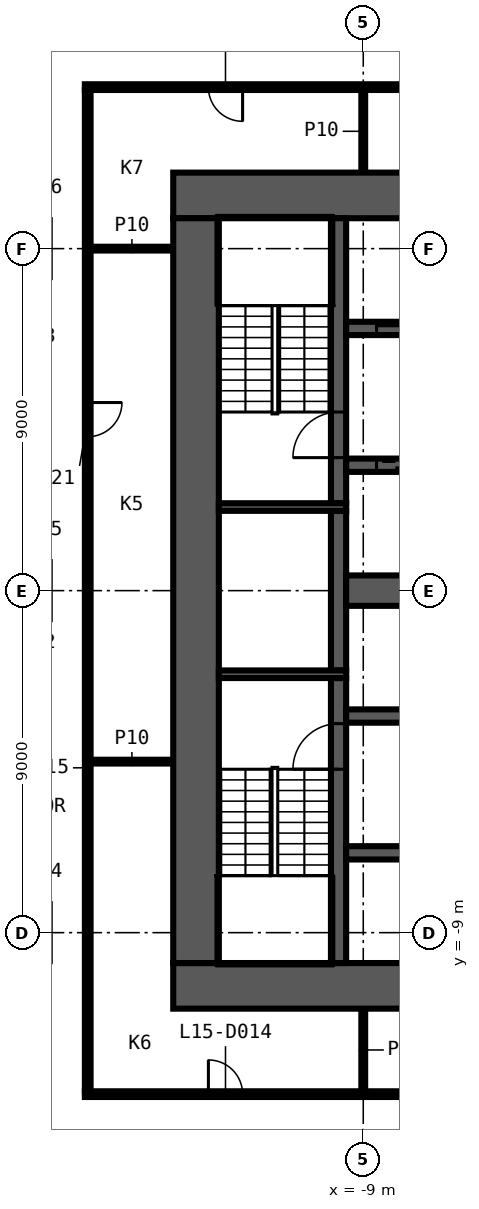
"""IFC4 building model, lengths in metres.
Left out: names, types, materials, properties, quantities, classifications, styles, units other than length and angle.
Written with IfcOpenShell. Run it as: python <this file> out.ifc"""

import sys

from ifc_helpers import new_model, si_unit, direction, frame, frame_2d, origin, place, context, subcontext, project, spatial, rectangle, extrude, element, fill, save


model = new_model("IFC4")
c1 = context("Model", 3, precision=1e-05, world=origin(), true_north=direction((0.0, 1.0)))
c2 = subcontext(c1, "Body", "Model", "MODEL_VIEW")
j1 = project(units=[si_unit("LENGTHUNIT", "METRE"), si_unit("PLANEANGLEUNIT", "RADIAN")], contexts=[c1])
p1 = place(None, origin())
s1 = spatial("IfcSite", under=j1, at=p1, CompositionType="ELEMENT")
p2 = place(p1, origin())
s2 = spatial("IfcBuilding", under=s1, at=p2, CompositionType="ELEMENT")
p3 = place(p2, frame((0.0, 0.0, 77.3)))
s3 = spatial("IfcBuildingStorey", under=s2, at=p3, CompositionType="ELEMENT", Elevation=77.3)
p4 = place(p3, frame((-16.325, -13.25, 0.0), z_axis=(0.0, 0.0, 1.0), x_axis=(1.0, 0.0, 0.0)))
e1 = element("IfcWall", 1, at=p4, inside=s3, PredefinedType="PARTITIONING", context=c2, shape_type="SweptSolid", body=[
    extrude(rectangle(XDim=23.15, YDim=0.15, at=frame_2d((11.575, 0.0))), origin(), (0.0, 0.0, 1.0), 3.3),
])
p5 = place(p4, frame((3.25, 0.0, 0.0)))
e2 = element("IfcOpeningElement", 2, at=p5, cuts=e1, PredefinedType="OPENING", context=c2, shape_type="SweptSolid", body=[
    extrude(rectangle(XDim=0.9, YDim=2.1, at=frame_2d((0.45, 1.05))), frame((0.0, 0.085, 0.0), z_axis=(0.0, -1.0, 0.0), x_axis=(1.0, 0.0, 0.0)), (0.0, 0.0, 1.0), 0.17),
])
p6 = place(p4, frame((19.25, 0.0, 0.0)))
e3 = element("IfcOpeningElement", 3, at=p6, cuts=e1, PredefinedType="OPENING", context=c2, shape_type="SweptSolid", body=[
    extrude(rectangle(XDim=0.9, YDim=2.1, at=frame_2d((0.45, 1.05))), frame((0.0, 0.085, 0.0), z_axis=(0.0, -1.0, 0.0), x_axis=(1.0, 0.0, 0.0)), (0.0, 0.0, 1.0), 0.17),
])
for number, where, z_axis, x_axis in (
    (4, (-16.175, -4.5, 0.0), (0.0, 0.0, 1.0), (1.0, 0.0, 0.0)),
    (5, (-16.175, 9.0, 0.0), (0.0, 0.0, 1.0), (1.0, 0.0, 0.0)),
):
    element("IfcWall", number, at=place(p3, frame(where, z_axis=z_axis, x_axis=x_axis)), inside=s3, PredefinedType="PARTITIONING", context=c2, shape_type="SweptSolid", body=[
        extrude(rectangle(XDim=2.175, YDim=0.1, at=frame_2d((1.087, 0.0))), origin(), (0.0, 0.0, 1.0), 3.3),
    ])
p7 = place(p3, frame((1.425, 13.25, 0.0), z_axis=(0.0, 0.0, 1.0), x_axis=(-1.0, 0.0, 0.0)))
e6 = element("IfcWall", 6, at=p7, inside=s3, PredefinedType="PARTITIONING", context=c2, shape_type="SweptSolid", body=[
    extrude(rectangle(XDim=17.75, YDim=0.15, at=frame_2d((8.875, 0.0))), origin(), (0.0, 0.0, 1.0), 3.3),
])
p8 = place(p7, frame((7.725, 0.0, 0.0)))
e7 = element("IfcOpeningElement", 7, at=p8, cuts=e6, PredefinedType="OPENING", context=c2, shape_type="SweptSolid", body=[
    extrude(rectangle(XDim=0.9, YDim=2.1, at=frame_2d((0.45, 1.05))), frame((0.0, 0.085, 0.0), z_axis=(0.0, -1.0, 0.0), x_axis=(1.0, 0.0, 0.0)), (0.0, 0.0, 1.0), 0.17),
])
p9 = place(p7, frame((13.6, 0.0, 0.0)))
e8 = element("IfcOpeningElement", 8, at=p9, cuts=e6, PredefinedType="OPENING", context=c2, shape_type="SweptSolid", body=[
    extrude(rectangle(XDim=0.9, YDim=2.1, at=frame_2d((0.45, 1.05))), frame((0.0, 0.085, 0.0), z_axis=(0.0, -1.0, 0.0), x_axis=(1.0, 0.0, 0.0)), (0.0, 0.0, 1.0), 0.17),
])
for number, where, z_axis, x_axis in (
    (9, (-9.0, -13.175, 0.0), (0.0, 0.0, 1.0), (0.0, 1.0, 0.0)),
    (10, (-9.0, 11.0, 0.0), (0.0, 0.0, 1.0), (0.0, 1.0, 0.0)),
):
    element("IfcWall", number, at=place(p3, frame(where, z_axis=z_axis, x_axis=x_axis)), inside=s3, PredefinedType="PARTITIONING", context=c2, shape_type="SweptSolid", body=[
        extrude(rectangle(XDim=2.175, YDim=0.1, at=frame_2d((1.087, 0.0))), origin(), (0.0, 0.0, 1.0), 3.3),
    ])
p10 = place(p3, frame((-16.25, 13.175, 0.0), z_axis=(0.0, 0.0, 1.0), x_axis=(0.0, -1.0, 0.0)))
e11 = element("IfcWall", 11, at=p10, inside=s3, PredefinedType="PARTITIONING", context=c2, shape_type="SweptSolid", body=[
    extrude(rectangle(XDim=26.35, YDim=0.15, at=frame_2d((13.175, 0.0))), origin(), (0.0, 0.0, 1.0), 3.3),
])
p11 = place(p10, frame((8.225, 0.0, 0.0)))
e12 = element("IfcOpeningElement", 12, at=p11, cuts=e11, PredefinedType="OPENING", context=c2, shape_type="SweptSolid", body=[
    extrude(rectangle(XDim=0.9, YDim=2.1, at=frame_2d((0.45, 1.05))), frame((0.0, 0.085, 0.0), z_axis=(0.0, -1.0, 0.0), x_axis=(1.0, 0.0, 0.0)), (0.0, 0.0, 1.0), 0.17),
])
p12 = place(p3, frame((-14.0, 10.4, 0.0), z_axis=(0.0, 0.0, 1.0), x_axis=(1.0, 0.0, 0.0)))
e13 = element("IfcWall", 13, at=p12, inside=s3, PredefinedType="SHEAR", context=c2, shape_type="SweptSolid", body=[
    extrude(rectangle(XDim=28.0, YDim=1.2, at=frame_2d((14.0, 0.0))), origin(), (0.0, 0.0, 1.0), 3.3),
])
p13 = place(p12, frame((15.9, 0.0, 0.0)))
e14 = element("IfcOpeningElement", 14, at=p13, cuts=e13, PredefinedType="OPENING", context=c2, shape_type="SweptSolid", body=[
    extrude(rectangle(XDim=1.6, YDim=2.1, at=frame_2d((0.8, 1.05))), frame((0.0, 0.61, 0.0), z_axis=(0.0, -1.0, 0.0), x_axis=(1.0, 0.0, 0.0)), (0.0, 0.0, 1.0), 1.22),
])
p14 = place(p3, frame((14.0, -10.4, 0.0), z_axis=(0.0, 0.0, 1.0), x_axis=(-1.0, 0.0, 0.0)))
e15 = element("IfcWall", 15, at=p14, inside=s3, PredefinedType="SHEAR", context=c2, shape_type="SweptSolid", body=[
    extrude(rectangle(XDim=28.0, YDim=1.2, at=frame_2d((14.0, 0.0))), origin(), (0.0, 0.0, 1.0), 3.3),
])
p15 = place(p14, frame((5.1, 0.0, 0.0)))
e16 = element("IfcOpeningElement", 16, at=p15, cuts=e15, PredefinedType="OPENING", context=c2, shape_type="SweptSolid", body=[
    extrude(rectangle(XDim=1.6, YDim=2.1, at=frame_2d((0.8, 1.05))), frame((0.0, 0.61, 0.0), z_axis=(0.0, -1.0, 0.0), x_axis=(1.0, 0.0, 0.0)), (0.0, 0.0, 1.0), 1.22),
])
p16 = place(p3, frame((-13.4, -9.8, 0.0), z_axis=(0.0, 0.0, 1.0), x_axis=(0.0, 1.0, 0.0)))
e17 = element("IfcWall", 17, at=p16, inside=s3, PredefinedType="SHEAR", context=c2, shape_type="SweptSolid", body=[
    extrude(rectangle(XDim=19.6, YDim=1.2, at=frame_2d((9.8, 0.0))), origin(), (0.0, 0.0, 1.0), 3.3),
])
p17 = place(p3, frame((-9.65, -9.8, 0.0), z_axis=(0.0, 0.0, 1.0), x_axis=(0.0, 1.0, 0.0)))
e18 = element("IfcWall", 18, at=p17, inside=s3, PredefinedType="SHEAR", context=c2, shape_type="SweptSolid", body=[
    extrude(rectangle(XDim=7.5, YDim=0.4, at=frame_2d((3.75, 0.0))), origin(), (0.0, 0.0, 1.0), 3.3),
])
p18 = place(p17, frame((5.1, 0.0, 0.0)))
e19 = element("IfcOpeningElement", 19, at=p18, cuts=e18, PredefinedType="OPENING", context=c2, shape_type="SweptSolid", body=[
    extrude(rectangle(XDim=1.2, YDim=2.1, at=frame_2d((0.6, 1.05))), frame((0.0, 0.21, 0.0), z_axis=(0.0, -1.0, 0.0), x_axis=(1.0, 0.0, 0.0)), (0.0, 0.0, 1.0), 0.42),
])
p19 = place(p3, frame((-9.65, -2.1, 0.0), z_axis=(0.0, 0.0, 1.0), x_axis=(0.0, 1.0, 0.0)))
e20 = element("IfcWall", 20, at=p19, inside=s3, PredefinedType="SHEAR", context=c2, shape_type="SweptSolid", body=[
    extrude(rectangle(XDim=4.2, YDim=0.4, at=frame_2d((2.1, 0.0))), origin(), (0.0, 0.0, 1.0), 3.3),
])
p20 = place(p3, frame((-9.65, 2.3, 0.0), z_axis=(0.0, 0.0, 1.0), x_axis=(0.0, 1.0, 0.0)))
e21 = element("IfcWall", 21, at=p20, inside=s3, PredefinedType="SHEAR", context=c2, shape_type="SweptSolid", body=[
    extrude(rectangle(XDim=7.5, YDim=0.4, at=frame_2d((3.75, 0.0))), origin(), (0.0, 0.0, 1.0), 3.3),
])
p21 = place(p20, frame((1.2, 0.0, 0.0)))
e22 = element("IfcOpeningElement", 22, at=p21, cuts=e21, PredefinedType="OPENING", context=c2, shape_type="SweptSolid", body=[
    extrude(rectangle(XDim=1.2, YDim=2.1, at=frame_2d((0.6, 1.05))), frame((0.0, 0.21, 0.0), z_axis=(0.0, -1.0, 0.0), x_axis=(1.0, 0.0, 0.0)), (0.0, 0.0, 1.0), 0.42),
])
for number, where, z_axis, x_axis in (
    (23, (-9.45, 2.2, 0.0), (0.0, 0.0, 1.0), (-1.0, 0.0, 0.0)),
    (24, (-9.45, -2.2, 0.0), (0.0, 0.0, 1.0), (-1.0, 0.0, 0.0)),
):
    element("IfcWall", number, at=place(p3, frame(where, z_axis=z_axis, x_axis=x_axis)), inside=s3, PredefinedType="SHEAR", context=c2, shape_type="SweptSolid", body=[
        extrude(rectangle(XDim=3.35, YDim=0.2, at=frame_2d((1.675, 0.0))), origin(), (0.0, 0.0, 1.0), 3.3),
    ])
p22 = place(p3, frame((-9.45, 6.9, 0.0), z_axis=(0.0, 0.0, 1.0), x_axis=(1.0, 0.0, 0.0)))
e25 = element("IfcWall", 25, at=p22, inside=s3, PredefinedType="SHEAR", context=c2, shape_type="SweptSolid", body=[
    extrude(rectangle(XDim=18.9, YDim=0.35, at=frame_2d((9.45, 0.0))), origin(), (0.0, 0.0, 1.0), 3.3),
])
p23 = place(p22, frame((0.8, 0.0, 0.0)))
e26 = element("IfcOpeningElement", 26, at=p23, cuts=e25, PredefinedType="OPENING", context=c2, shape_type="SweptSolid", body=[
    extrude(rectangle(XDim=1.1, YDim=2.1, at=frame_2d((0.55, 1.05))), frame((0.0, 0.185, 0.0), z_axis=(0.0, -1.0, 0.0), x_axis=(1.0, 0.0, 0.0)), (0.0, 0.0, 1.0), 0.37),
])
p24 = place(p22, frame((3.5, 0.0, 0.0)))
e27 = element("IfcOpeningElement", 27, at=p24, cuts=e25, PredefinedType="OPENING", context=c2, shape_type="SweptSolid", body=[
    extrude(rectangle(XDim=1.1, YDim=2.1, at=frame_2d((0.55, 1.05))), frame((0.0, 0.185, 0.0), z_axis=(0.0, -1.0, 0.0), x_axis=(1.0, 0.0, 0.0)), (0.0, 0.0, 1.0), 0.37),
])
p25 = place(p22, frame((6.2, 0.0, 0.0)))
e28 = element("IfcOpeningElement", 28, at=p25, cuts=e25, PredefinedType="OPENING", context=c2, shape_type="SweptSolid", body=[
    extrude(rectangle(XDim=1.1, YDim=2.1, at=frame_2d((0.55, 1.05))), frame((0.0, 0.185, 0.0), z_axis=(0.0, -1.0, 0.0), x_axis=(1.0, 0.0, 0.0)), (0.0, 0.0, 1.0), 0.37),
])
p26 = place(p22, frame((8.9, 0.0, 0.0)))
e29 = element("IfcOpeningElement", 29, at=p26, cuts=e25, PredefinedType="OPENING", context=c2, shape_type="SweptSolid", body=[
    extrude(rectangle(XDim=1.1, YDim=2.1, at=frame_2d((0.55, 1.05))), frame((0.0, 0.185, 0.0), z_axis=(0.0, -1.0, 0.0), x_axis=(1.0, 0.0, 0.0)), (0.0, 0.0, 1.0), 0.37),
])
p27 = place(p22, frame((11.55, 0.0, 0.0)))
e30 = element("IfcOpeningElement", 30, at=p27, cuts=e25, PredefinedType="OPENING", context=c2, shape_type="SweptSolid", body=[
    extrude(rectangle(XDim=1.2, YDim=2.1, at=frame_2d((0.6, 1.05))), frame((0.0, 0.185, 0.0), z_axis=(0.0, -1.0, 0.0), x_axis=(1.0, 0.0, 0.0)), (0.0, 0.0, 1.0), 0.37),
])
p28 = place(p22, frame((14.3, 0.0, 0.0)))
e31 = element("IfcOpeningElement", 31, at=p28, cuts=e25, PredefinedType="OPENING", context=c2, shape_type="SweptSolid", body=[
    extrude(rectangle(XDim=1.1, YDim=2.1, at=frame_2d((0.55, 1.05))), frame((0.0, 0.185, 0.0), z_axis=(0.0, -1.0, 0.0), x_axis=(1.0, 0.0, 0.0)), (0.0, 0.0, 1.0), 0.37),
])
p29 = place(p22, frame((17.0, 0.0, 0.0)))
e32 = element("IfcOpeningElement", 32, at=p29, cuts=e25, PredefinedType="OPENING", context=c2, shape_type="SweptSolid", body=[
    extrude(rectangle(XDim=1.1, YDim=2.1, at=frame_2d((0.55, 1.05))), frame((0.0, 0.185, 0.0), z_axis=(0.0, -1.0, 0.0), x_axis=(1.0, 0.0, 0.0)), (0.0, 0.0, 1.0), 0.37),
])
p30 = place(p3, frame((9.45, 3.3, 0.0), z_axis=(0.0, 0.0, 1.0), x_axis=(-1.0, 0.0, 0.0)))
e33 = element("IfcWall", 33, at=p30, inside=s3, PredefinedType="SHEAR", context=c2, shape_type="SweptSolid", body=[
    extrude(rectangle(XDim=18.9, YDim=0.35, at=frame_2d((9.45, 0.0))), origin(), (0.0, 0.0, 1.0), 3.3),
])
p31 = place(p30, frame((17.0, 0.0, 0.0)))
e34 = element("IfcOpeningElement", 34, at=p31, cuts=e33, PredefinedType="OPENING", context=c2, shape_type="SweptSolid", body=[
    extrude(rectangle(XDim=1.1, YDim=2.1, at=frame_2d((0.55, 1.05))), frame((0.0, 0.185, 0.0), z_axis=(0.0, -1.0, 0.0), x_axis=(1.0, 0.0, 0.0)), (0.0, 0.0, 1.0), 0.37),
])
p32 = place(p30, frame((14.3, 0.0, 0.0)))
e35 = element("IfcOpeningElement", 35, at=p32, cuts=e33, PredefinedType="OPENING", context=c2, shape_type="SweptSolid", body=[
    extrude(rectangle(XDim=1.1, YDim=2.1, at=frame_2d((0.55, 1.05))), frame((0.0, 0.185, 0.0), z_axis=(0.0, -1.0, 0.0), x_axis=(1.0, 0.0, 0.0)), (0.0, 0.0, 1.0), 0.37),
])
p33 = place(p30, frame((11.6, 0.0, 0.0)))
e36 = element("IfcOpeningElement", 36, at=p33, cuts=e33, PredefinedType="OPENING", context=c2, shape_type="SweptSolid", body=[
    extrude(rectangle(XDim=1.1, YDim=2.1, at=frame_2d((0.55, 1.05))), frame((0.0, 0.185, 0.0), z_axis=(0.0, -1.0, 0.0), x_axis=(1.0, 0.0, 0.0)), (0.0, 0.0, 1.0), 0.37),
])
p34 = place(p30, frame((8.9, 0.0, 0.0)))
e37 = element("IfcOpeningElement", 37, at=p34, cuts=e33, PredefinedType="OPENING", context=c2, shape_type="SweptSolid", body=[
    extrude(rectangle(XDim=1.1, YDim=2.1, at=frame_2d((0.55, 1.05))), frame((0.0, 0.185, 0.0), z_axis=(0.0, -1.0, 0.0), x_axis=(1.0, 0.0, 0.0)), (0.0, 0.0, 1.0), 0.37),
])
p35 = place(p30, frame((6.2, 0.0, 0.0)))
e38 = element("IfcOpeningElement", 38, at=p35, cuts=e33, PredefinedType="OPENING", context=c2, shape_type="SweptSolid", body=[
    extrude(rectangle(XDim=1.1, YDim=2.1, at=frame_2d((0.55, 1.05))), frame((0.0, 0.185, 0.0), z_axis=(0.0, -1.0, 0.0), x_axis=(1.0, 0.0, 0.0)), (0.0, 0.0, 1.0), 0.37),
])
p36 = place(p30, frame((3.5, 0.0, 0.0)))
e39 = element("IfcOpeningElement", 39, at=p36, cuts=e33, PredefinedType="OPENING", context=c2, shape_type="SweptSolid", body=[
    extrude(rectangle(XDim=1.1, YDim=2.1, at=frame_2d((0.55, 1.05))), frame((0.0, 0.185, 0.0), z_axis=(0.0, -1.0, 0.0), x_axis=(1.0, 0.0, 0.0)), (0.0, 0.0, 1.0), 0.37),
])
p37 = place(p30, frame((0.9, 0.0, 0.0)))
e40 = element("IfcOpeningElement", 40, at=p37, cuts=e33, PredefinedType="OPENING", context=c2, shape_type="SweptSolid", body=[
    extrude(rectangle(XDim=0.9, YDim=2.1, at=frame_2d((0.45, 1.05))), frame((0.0, 0.185, 0.0), z_axis=(0.0, -1.0, 0.0), x_axis=(1.0, 0.0, 0.0)), (0.0, 0.0, 1.0), 0.37),
])
p38 = place(p3, frame((-9.45, -3.3, 0.0), z_axis=(0.0, 0.0, 1.0), x_axis=(1.0, 0.0, 0.0)))
e41 = element("IfcWall", 41, at=p38, inside=s3, PredefinedType="SHEAR", context=c2, shape_type="SweptSolid", body=[
    extrude(rectangle(XDim=18.9, YDim=0.35, at=frame_2d((9.45, 0.0))), origin(), (0.0, 0.0, 1.0), 3.3),
])
p39 = place(p38, frame((17.0, 0.0, 0.0)))
e42 = element("IfcOpeningElement", 42, at=p39, cuts=e41, PredefinedType="OPENING", context=c2, shape_type="SweptSolid", body=[
    extrude(rectangle(XDim=1.1, YDim=2.1, at=frame_2d((0.55, 1.05))), frame((0.0, 0.185, 0.0), z_axis=(0.0, -1.0, 0.0), x_axis=(1.0, 0.0, 0.0)), (0.0, 0.0, 1.0), 0.37),
])
p40 = place(p38, frame((3.6, 0.0, 0.0)))
e43 = element("IfcOpeningElement", 43, at=p40, cuts=e41, PredefinedType="OPENING", context=c2, shape_type="SweptSolid", body=[
    extrude(rectangle(XDim=0.9, YDim=2.1, at=frame_2d((0.45, 1.05))), frame((0.0, 0.185, 0.0), z_axis=(0.0, -1.0, 0.0), x_axis=(1.0, 0.0, 0.0)), (0.0, 0.0, 1.0), 0.37),
])
p41 = place(p38, frame((9.0, 0.0, 0.0)))
e44 = element("IfcOpeningElement", 44, at=p41, cuts=e41, PredefinedType="OPENING", context=c2, shape_type="SweptSolid", body=[
    extrude(rectangle(XDim=0.9, YDim=2.1, at=frame_2d((0.45, 1.05))), frame((0.0, 0.185, 0.0), z_axis=(0.0, -1.0, 0.0), x_axis=(1.0, 0.0, 0.0)), (0.0, 0.0, 1.0), 0.37),
])
p42 = place(p3, frame((9.45, -6.9, 0.0), z_axis=(0.0, 0.0, 1.0), x_axis=(-1.0, 0.0, 0.0)))
e45 = element("IfcWall", 45, at=p42, inside=s3, PredefinedType="SHEAR", context=c2, shape_type="SweptSolid", body=[
    extrude(rectangle(XDim=18.9, YDim=0.35, at=frame_2d((9.45, 0.0))), origin(), (0.0, 0.0, 1.0), 3.3),
])
p43 = place(p42, frame((0.75, 0.0, 0.0)))
e46 = element("IfcOpeningElement", 46, at=p43, cuts=e45, PredefinedType="OPENING", context=c2, shape_type="SweptSolid", body=[
    extrude(rectangle(XDim=1.2, YDim=2.1, at=frame_2d((0.6, 1.05))), frame((0.0, 0.185, 0.0), z_axis=(0.0, -1.0, 0.0), x_axis=(1.0, 0.0, 0.0)), (0.0, 0.0, 1.0), 0.37),
])
p44 = place(p42, frame((14.4, 0.0, 0.0)))
e47 = element("IfcOpeningElement", 47, at=p44, cuts=e45, PredefinedType="OPENING", context=c2, shape_type="SweptSolid", body=[
    extrude(rectangle(XDim=0.9, YDim=2.1, at=frame_2d((0.45, 1.05))), frame((0.0, 0.185, 0.0), z_axis=(0.0, -1.0, 0.0), x_axis=(1.0, 0.0, 0.0)), (0.0, 0.0, 1.0), 0.37),
])
p45 = place(p42, frame((9.0, 0.0, 0.0)))
e48 = element("IfcOpeningElement", 48, at=p45, cuts=e45, PredefinedType="OPENING", context=c2, shape_type="SweptSolid", body=[
    extrude(rectangle(XDim=0.9, YDim=2.1, at=frame_2d((0.45, 1.05))), frame((0.0, 0.185, 0.0), z_axis=(0.0, -1.0, 0.0), x_axis=(1.0, 0.0, 0.0)), (0.0, 0.0, 1.0), 0.37),
])
p46 = place(p3, frame((-9.45, 0.0, 0.0), z_axis=(0.0, 0.0, 1.0), x_axis=(1.0, 0.0, 0.0)))
e49 = element("IfcWall", 49, at=p46, inside=s3, PredefinedType="SHEAR", context=c2, shape_type="SweptSolid", body=[
    extrude(rectangle(XDim=18.9, YDim=0.8, at=frame_2d((9.45, 0.0))), origin(), (0.0, 0.0, 1.0), 3.3),
])
p47 = place(p5, origin())
e50 = element("IfcDoor", 50, at=p47, inside=s3, OperationType="SINGLE_SWING_RIGHT", PredefinedType="DOOR", context=c2, shape_type="SweptSolid", body=[
    extrude(rectangle(XDim=0.9, YDim=2.1, at=frame_2d((0.45, 1.05))), frame((0.0, 0.025, 0.0), z_axis=(0.0, -1.0, 0.0), x_axis=(1.0, 0.0, 0.0)), (0.0, 0.0, 1.0), 0.05),
])
fill(e2, e50)
p48 = place(p9, origin())
e51 = element("IfcDoor", 51, at=p48, inside=s3, OperationType="SINGLE_SWING_RIGHT", PredefinedType="DOOR", context=c2, shape_type="SweptSolid", body=[
    extrude(rectangle(XDim=0.9, YDim=2.1, at=frame_2d((0.45, 1.05))), frame((0.0, 0.025, 0.0), z_axis=(0.0, -1.0, 0.0), x_axis=(1.0, 0.0, 0.0)), (0.0, 0.0, 1.0), 0.05),
])
fill(e8, e51)
p49 = place(p11, origin())
e52 = element("IfcDoor", 52, at=p49, inside=s3, OperationType="SINGLE_SWING_LEFT", PredefinedType="DOOR", context=c2, shape_type="SweptSolid", body=[
    extrude(rectangle(XDim=0.9, YDim=2.1, at=frame_2d((0.45, 1.05))), frame((0.0, 0.025, 0.0), z_axis=(0.0, -1.0, 0.0), x_axis=(1.0, 0.0, 0.0)), (0.0, 0.0, 1.0), 0.05),
])
fill(e12, e52)
p50 = place(p23, origin())
e53 = element("IfcDoor", 53, at=p50, inside=s3, OperationType="DOUBLE_DOOR_SLIDING", PredefinedType="DOOR", context=c2, shape_type="SweptSolid", body=[
    extrude(rectangle(XDim=1.1, YDim=2.1, at=frame_2d((0.55, 1.05))), frame((0.0, 0.025, 0.0), z_axis=(0.0, -1.0, 0.0), x_axis=(1.0, 0.0, 0.0)), (0.0, 0.0, 1.0), 0.05),
])
fill(e26, e53)
p51 = place(p31, origin())
e54 = element("IfcDoor", 54, at=p51, inside=s3, OperationType="DOUBLE_DOOR_SLIDING", PredefinedType="DOOR", context=c2, shape_type="SweptSolid", body=[
    extrude(rectangle(XDim=1.1, YDim=2.1, at=frame_2d((0.55, 1.05))), frame((0.0, 0.025, 0.0), z_axis=(0.0, -1.0, 0.0), x_axis=(1.0, 0.0, 0.0)), (0.0, 0.0, 1.0), 0.05),
])
fill(e34, e54)
p52 = place(p21, origin())
e55 = element("IfcDoor", 55, at=p52, inside=s3, OperationType="SINGLE_SWING_RIGHT", PredefinedType="DOOR", context=c2, shape_type="SweptSolid", body=[
    extrude(rectangle(XDim=1.2, YDim=2.1, at=frame_2d((0.6, 1.05))), frame((0.0, 0.025, 0.0), z_axis=(0.0, -1.0, 0.0), x_axis=(1.0, 0.0, 0.0)), (0.0, 0.0, 1.0), 0.05),
])
fill(e22, e55)
p53 = place(p18, origin())
e56 = element("IfcDoor", 56, at=p53, inside=s3, OperationType="SINGLE_SWING_LEFT", PredefinedType="DOOR", context=c2, shape_type="SweptSolid", body=[
    extrude(rectangle(XDim=1.2, YDim=2.1, at=frame_2d((0.6, 1.05))), frame((0.0, 0.025, 0.0), z_axis=(0.0, -1.0, 0.0), x_axis=(1.0, 0.0, 0.0)), (0.0, 0.0, 1.0), 0.05),
])
fill(e19, e56)
save(model, sys.argv[1])
